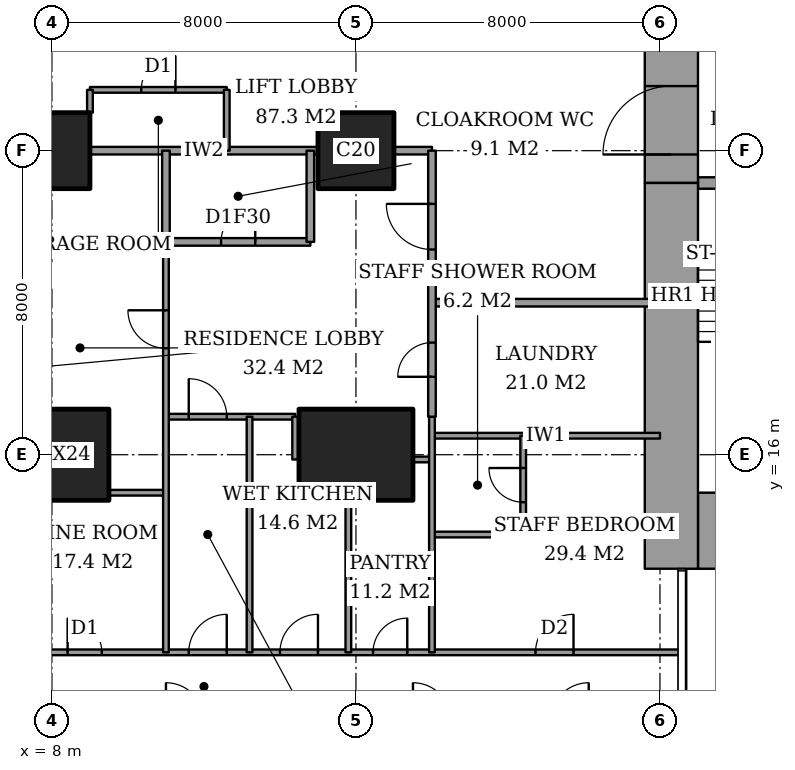
"""IFC4 building model, lengths in metres.
Left out: names, types, materials, properties, quantities, classifications, styles, units other than length and angle.
Written with IfcOpenShell. Run it as: python <this file> out.ifc"""

import sys

from ifc_helpers import new_model, si_unit, direction, frame, frame_2d, origin, origin_2d, place, context, subcontext, project, spatial, rectangle, extrude, element, fill, save


model = new_model("IFC4")
c1 = context("Model", 3, precision=1e-05, world=origin(), true_north=direction((0.0, 1.0)))
c2 = subcontext(c1, "Body", "Model", "MODEL_VIEW")
j1 = project(units=[si_unit("LENGTHUNIT", "METRE"), si_unit("PLANEANGLEUNIT", "RADIAN")], contexts=[c1])
p1 = place(None, origin())
s1 = spatial("IfcSite", under=j1, at=p1, CompositionType="ELEMENT")
p2 = place(p1, origin())
s2 = spatial("IfcBuilding", under=s1, at=p2, CompositionType="ELEMENT")
p3 = place(p2, frame((0.0, 0.0, 96.2)))
s3 = spatial("IfcBuildingStorey", under=s2, at=p3, CompositionType="ELEMENT", Elevation=96.2)
p4 = place(p3, frame((8.0, 16.0, 0.0), z_axis=(0.0, 0.0, 1.0), x_axis=(1.0, 0.0, 0.0)))
e1 = element("IfcColumn", 1, at=p4, inside=s3, PredefinedType="COLUMN", context=c2, shape_type="SweptSolid", body=[
    extrude(rectangle(XDim=3.0, YDim=2.4, at=origin_2d()), origin(), (0.0, 0.0, 1.0), 3.6),
])
p5 = place(p3, frame((8.0, 24.0, 0.0), z_axis=(0.0, 0.0, 1.0), x_axis=(1.0, 0.0, 0.0)))
e2 = element("IfcColumn", 2, at=p5, inside=s3, PredefinedType="COLUMN", context=c2, shape_type="SweptSolid", body=[
    extrude(rectangle(XDim=2.0, YDim=2.0, at=origin_2d()), origin(), (0.0, 0.0, 1.0), 3.6),
])
p6 = place(p3, frame((16.0, 16.0, 0.0), z_axis=(0.0, 0.0, 1.0), x_axis=(1.0, 0.0, 0.0)))
e3 = element("IfcColumn", 3, at=p6, inside=s3, PredefinedType="COLUMN", context=c2, shape_type="SweptSolid", body=[
    extrude(rectangle(XDim=3.0, YDim=2.4, at=origin_2d()), origin(), (0.0, 0.0, 1.0), 3.6),
])
p7 = place(p3, frame((16.0, 24.0, 0.0), z_axis=(0.0, 0.0, 1.0), x_axis=(1.0, 0.0, 0.0)))
e4 = element("IfcColumn", 4, at=p7, inside=s3, PredefinedType="COLUMN", context=c2, shape_type="SweptSolid", body=[
    extrude(rectangle(XDim=2.0, YDim=2.0, at=origin_2d()), origin(), (0.0, 0.0, 1.0), 3.6),
])
p8 = place(p3, frame((25.0, 14.0, 0.0), z_axis=(0.0, 0.0, 1.0), x_axis=(1.0, 0.0, 0.0)))
e5 = element("IfcWall", 5, at=p8, inside=s3, PredefinedType="SHEAR", context=c2, shape_type="SweptSolid", body=[
    extrude(rectangle(XDim=3.15, YDim=2.0, at=frame_2d((1.575, 0.0))), origin(), (0.0, 0.0, 1.0), 3.6),
])
p9 = place(p3, frame((24.3, 13.0, 0.0), z_axis=(0.0, 0.0, 1.0), x_axis=(0.0, 1.0, 0.0)))
e6 = element("IfcWall", 6, at=p9, inside=s3, PredefinedType="SHEAR", context=c2, shape_type="SweptSolid", body=[
    extrude(rectangle(XDim=10.15, YDim=1.4, at=frame_2d((5.075, 0.0))), origin(), (0.0, 0.0, 1.0), 3.6),
])
p10 = place(p3, frame((24.3, 23.15, 0.0), z_axis=(0.0, 0.0, 1.0), x_axis=(0.0, 1.0, 0.0)))
e7 = element("IfcWall", 7, at=p10, inside=s3, PredefinedType="SHEAR", context=c2, shape_type="SweptSolid", body=[
    extrude(rectangle(XDim=11.85, YDim=1.4, at=frame_2d((5.925, 0.0))), origin(), (0.0, 0.0, 1.0), 3.6),
])
p11 = place(p10, frame((0.75, 0.0, 0.0)))
e8 = element("IfcOpeningElement", 8, at=p11, cuts=e7, PredefinedType="OPENING", context=c2, shape_type="SweptSolid", body=[
    extrude(rectangle(XDim=1.8, YDim=2.4, at=frame_2d((0.9, 1.2))), frame((0.0, 0.71, 0.0), z_axis=(0.0, -1.0, 0.0), x_axis=(1.0, 0.0, 0.0)), (0.0, 0.0, 1.0), 1.42),
])
p12 = place(p3, frame((25.0, 23.15, 0.0), z_axis=(0.0, 0.0, 1.0), x_axis=(1.0, 0.0, 0.0)))
e9 = element("IfcWall", 9, at=p12, inside=s3, PredefinedType="SHEAR", context=c2, shape_type="SweptSolid", body=[
    extrude(rectangle(XDim=3.15, YDim=0.3, at=frame_2d((1.575, 0.0))), origin(), (0.0, 0.0, 1.0), 3.6),
])
p13 = place(p12, frame((0.6, 0.0, 0.0)))
e10 = element("IfcOpeningElement", 10, at=p13, cuts=e9, PredefinedType="OPENING", context=c2, shape_type="SweptSolid", body=[
    extrude(rectangle(XDim=1.0, YDim=2.1, at=frame_2d((0.5, 1.05))), frame((0.0, 0.16, 0.0), z_axis=(0.0, -1.0, 0.0), x_axis=(1.0, 0.0, 0.0)), (0.0, 0.0, 1.0), 0.32),
])
p14 = place(p3, frame((-0.45, 10.8, 0.0), z_axis=(0.0, 0.0, 1.0), x_axis=(1.0, 0.0, 0.0)))
e11 = element("IfcWall", 11, at=p14, inside=s3, PredefinedType="PARTITIONING", context=c2, shape_type="SweptSolid", body=[
    extrude(rectangle(XDim=25.011, YDim=0.15, at=frame_2d((12.505, 0.0))), origin(), (0.0, 0.0, 1.0), 3.35),
])
p15 = place(p14, frame((12.05, 0.0, 0.0)))
e12 = element("IfcOpeningElement", 12, at=p15, cuts=e11, PredefinedType="OPENING", context=c2, shape_type="SweptSolid", body=[
    extrude(rectangle(XDim=1.0, YDim=2.1, at=frame_2d((0.5, 1.05))), frame((0.0, 0.085, 0.0), z_axis=(0.0, -1.0, 0.0), x_axis=(1.0, 0.0, 0.0)), (0.0, 0.0, 1.0), 0.17),
])
p16 = place(p14, frame((3.087, 0.0, 0.0)))
e13 = element("IfcOpeningElement", 13, at=p16, cuts=e11, PredefinedType="OPENING", context=c2, shape_type="SweptSolid", body=[
    extrude(rectangle(XDim=1.0, YDim=2.1, at=frame_2d((0.5, 1.05))), frame((0.0, 0.085, 0.0), z_axis=(0.0, -1.0, 0.0), x_axis=(1.0, 0.0, 0.0)), (0.0, 0.0, 1.0), 0.17),
])
p17 = place(p14, frame((8.863, 0.0, 0.0)))
e14 = element("IfcOpeningElement", 14, at=p17, cuts=e11, PredefinedType="OPENING", context=c2, shape_type="SweptSolid", body=[
    extrude(rectangle(XDim=0.9, YDim=2.1, at=frame_2d((0.45, 1.05))), frame((0.0, 0.085, 0.0), z_axis=(0.0, -1.0, 0.0), x_axis=(1.0, 0.0, 0.0)), (0.0, 0.0, 1.0), 0.17),
])
p18 = place(p14, frame((14.45, 0.0, 0.0)))
e15 = element("IfcOpeningElement", 15, at=p18, cuts=e11, PredefinedType="OPENING", context=c2, shape_type="SweptSolid", body=[
    extrude(rectangle(XDim=1.0, YDim=2.1, at=frame_2d((0.5, 1.05))), frame((0.0, 0.085, 0.0), z_axis=(0.0, -1.0, 0.0), x_axis=(1.0, 0.0, 0.0)), (0.0, 0.0, 1.0), 0.17),
])
p19 = place(p14, frame((16.9, 0.0, 0.0)))
e16 = element("IfcOpeningElement", 16, at=p19, cuts=e11, PredefinedType="OPENING", context=c2, shape_type="SweptSolid", body=[
    extrude(rectangle(XDim=0.9, YDim=2.1, at=frame_2d((0.45, 1.05))), frame((0.0, 0.085, 0.0), z_axis=(0.0, -1.0, 0.0), x_axis=(1.0, 0.0, 0.0)), (0.0, 0.0, 1.0), 0.17),
])
p20 = place(p14, frame((21.175, 0.0, 0.0)))
e17 = element("IfcOpeningElement", 17, at=p20, cuts=e11, PredefinedType="OPENING", context=c2, shape_type="SweptSolid", body=[
    extrude(rectangle(XDim=1.0, YDim=2.1, at=frame_2d((0.5, 1.05))), frame((0.0, 0.085, 0.0), z_axis=(0.0, -1.0, 0.0), x_axis=(1.0, 0.0, 0.0)), (0.0, 0.0, 1.0), 0.17),
])
p21 = place(p3, frame((18.0, 13.9, 0.0), z_axis=(0.0, 0.0, 1.0), x_axis=(1.0, 0.0, 0.0)))
e18 = element("IfcWall", 18, at=p21, inside=s3, PredefinedType="PARTITIONING", context=c2, shape_type="SweptSolid", body=[
    extrude(rectangle(XDim=2.4, YDim=0.15, at=frame_2d((1.2, 0.0))), origin(), (0.0, 0.0, 1.0), 3.35),
])
p22 = place(p3, frame((9.5, 15.0, 0.0), z_axis=(0.0, 0.0, 1.0), x_axis=(1.0, 0.0, 0.0)))
e19 = element("IfcWall", 19, at=p22, inside=s3, PredefinedType="PARTITIONING", context=c2, shape_type="SweptSolid", body=[
    extrude(rectangle(XDim=1.5, YDim=0.15, at=frame_2d((0.75, 0.0))), origin(), (0.0, 0.0, 1.0), 3.35),
])
p23 = place(p3, frame((17.5, 15.875, 0.0), z_axis=(0.0, 0.0, 1.0), x_axis=(1.0, 0.0, 0.0)))
e20 = element("IfcWall", 20, at=p23, inside=s3, PredefinedType="PARTITIONING", context=c2, shape_type="SweptSolid", body=[
    extrude(rectangle(XDim=0.5, YDim=0.15, at=frame_2d((0.25, 0.0))), origin(), (0.0, 0.0, 1.0), 2.634),
])
p24 = place(p3, frame((18.0, 16.5, 0.0), z_axis=(0.0, 0.0, 1.0), x_axis=(1.0, 0.0, 0.0)))
e21 = element("IfcWall", 21, at=p24, inside=s3, PredefinedType="PARTITIONING", context=c2, shape_type="SweptSolid", body=[
    extrude(rectangle(XDim=6.0, YDim=0.15, at=frame_2d((3.0, 0.0))), origin(), (0.0, 0.0, 1.0), 3.35),
])
p25 = place(p3, frame((11.0, 17.0, 0.0), z_axis=(0.0, 0.0, 1.0), x_axis=(1.0, 0.0, 0.0)))
e22 = element("IfcWall", 22, at=p25, inside=s3, PredefinedType="PARTITIONING", context=c2, shape_type="SweptSolid", body=[
    extrude(rectangle(XDim=3.4, YDim=0.15, at=frame_2d((1.7, 0.0))), origin(), (0.0, 0.0, 1.0), 3.35),
])
p26 = place(p25, frame((0.6, 0.0, 0.0)))
e23 = element("IfcOpeningElement", 23, at=p26, cuts=e22, PredefinedType="OPENING", context=c2, shape_type="SweptSolid", body=[
    extrude(rectangle(XDim=1.0, YDim=2.1, at=frame_2d((0.5, 1.05))), frame((0.0, 0.085, 0.0), z_axis=(0.0, -1.0, 0.0), x_axis=(1.0, 0.0, 0.0)), (0.0, 0.0, 1.0), 0.17),
])
p27 = place(p3, frame((18.0, 20.0, 0.0), z_axis=(0.0, 0.0, 1.0), x_axis=(1.0, 0.0, 0.0)))
e24 = element("IfcWall", 24, at=p27, inside=s3, PredefinedType="PARTITIONING", context=c2, shape_type="SweptSolid", body=[
    extrude(rectangle(XDim=6.0, YDim=0.2, at=frame_2d((3.0, 0.0))), origin(), (0.0, 0.0, 1.0), 3.35),
])
p28 = place(p3, frame((11.0, 21.6, 0.0), z_axis=(0.0, 0.0, 1.0), x_axis=(1.0, 0.0, 0.0)))
e25 = element("IfcWall", 25, at=p28, inside=s3, PredefinedType="PARTITIONING", context=c2, shape_type="SweptSolid", body=[
    extrude(rectangle(XDim=3.8, YDim=0.2, at=frame_2d((1.9, 0.0))), origin(), (0.0, 0.0, 1.0), 3.35),
])
p29 = place(p28, frame((1.45, 0.0, 0.0)))
e26 = element("IfcOpeningElement", 26, at=p29, cuts=e25, PredefinedType="OPENING", context=c2, shape_type="SweptSolid", body=[
    extrude(rectangle(XDim=0.9, YDim=2.1, at=frame_2d((0.45, 1.05))), frame((0.0, 0.11, 0.0), z_axis=(0.0, -1.0, 0.0), x_axis=(1.0, 0.0, 0.0)), (0.0, 0.0, 1.0), 0.22),
])
p30 = place(p3, frame((9.0, 24.0, 0.0), z_axis=(0.0, 0.0, 1.0), x_axis=(1.0, 0.0, 0.0)))
e27 = element("IfcWall", 27, at=p30, inside=s3, PredefinedType="PARTITIONING", context=c2, shape_type="SweptSolid", body=[
    extrude(rectangle(XDim=6.0, YDim=0.2, at=frame_2d((3.0, 0.0))), origin(), (0.0, 0.0, 1.0), 3.35),
])
p31 = place(p3, frame((17.0, 24.0, 0.0), z_axis=(0.0, 0.0, 1.0), x_axis=(1.0, 0.0, 0.0)))
e28 = element("IfcWall", 28, at=p31, inside=s3, PredefinedType="PARTITIONING", context=c2, shape_type="SweptSolid", body=[
    extrude(rectangle(XDim=1.0, YDim=0.2, at=frame_2d((0.5, 0.0))), origin(), (0.0, 0.0, 1.0), 3.35),
])
p32 = place(p3, frame((9.0, 25.6, 0.0), z_axis=(0.0, 0.0, 1.0), x_axis=(1.0, 0.0, 0.0)))
e29 = element("IfcWall", 29, at=p32, inside=s3, PredefinedType="PARTITIONING", context=c2, shape_type="SweptSolid", body=[
    extrude(rectangle(XDim=3.6, YDim=0.15, at=frame_2d((1.8, 0.0))), origin(), (0.0, 0.0, 1.0), 3.35),
])
p33 = place(p32, frame((1.35, 0.0, 0.0)))
e30 = element("IfcOpeningElement", 30, at=p33, cuts=e29, PredefinedType="OPENING", context=c2, shape_type="SweptSolid", body=[
    extrude(rectangle(XDim=0.9, YDim=2.1, at=frame_2d((0.45, 1.05))), frame((0.0, 0.085, 0.0), z_axis=(0.0, -1.0, 0.0), x_axis=(1.0, 0.0, 0.0)), (0.0, 0.0, 1.0), 0.17),
])
p34 = place(p3, frame((9.0, 25.0, 0.0), z_axis=(0.0, 0.0, 1.0), x_axis=(0.0, 1.0, 0.0)))
e31 = element("IfcWall", 31, at=p34, inside=s3, PredefinedType="PARTITIONING", context=c2, shape_type="SweptSolid", body=[
    extrude(rectangle(XDim=0.6, YDim=0.15, at=frame_2d((0.3, 0.0))), origin(), (0.0, 0.0, 1.0), 3.35),
])
p35 = place(p3, frame((11.0, 21.6, 0.0), z_axis=(0.0, 0.0, 1.0), x_axis=(0.0, 1.0, 0.0)))
e32 = element("IfcWall", 32, at=p35, inside=s3, PredefinedType="PARTITIONING", context=c2, shape_type="SweptSolid", body=[
    extrude(rectangle(XDim=2.4, YDim=0.2, at=frame_2d((1.2, 0.0))), origin(), (0.0, 0.0, 1.0), 3.35),
])
p36 = place(p3, frame((11.0, 10.8, 0.0), z_axis=(0.0, 0.0, 1.0), x_axis=(0.0, 1.0, 0.0)))
e33 = element("IfcWall", 33, at=p36, inside=s3, PredefinedType="PARTITIONING", context=c2, shape_type="SweptSolid", body=[
    extrude(rectangle(XDim=10.8, YDim=0.15, at=frame_2d((5.4, 0.0))), origin(), (0.0, 0.0, 1.0), 3.35),
])
p37 = place(p36, frame((8.0, 0.0, 0.0)))
e34 = element("IfcOpeningElement", 34, at=p37, cuts=e33, PredefinedType="OPENING", context=c2, shape_type="SweptSolid", body=[
    extrude(rectangle(XDim=1.0, YDim=2.1, at=frame_2d((0.5, 1.05))), frame((0.0, 0.085, 0.0), z_axis=(0.0, -1.0, 0.0), x_axis=(1.0, 0.0, 0.0)), (0.0, 0.0, 1.0), 0.17),
])
p38 = place(p3, frame((12.6, 24.0, 0.0), z_axis=(0.0, 0.0, 1.0), x_axis=(0.0, 1.0, 0.0)))
e35 = element("IfcWall", 35, at=p38, inside=s3, PredefinedType="PARTITIONING", context=c2, shape_type="SweptSolid", body=[
    extrude(rectangle(XDim=1.6, YDim=0.15, at=frame_2d((0.8, 0.0))), origin(), (0.0, 0.0, 1.0), 3.35),
])
p39 = place(p3, frame((13.2, 10.8, 0.0), z_axis=(0.0, 0.0, 1.0), x_axis=(0.0, 1.0, 0.0)))
e36 = element("IfcWall", 36, at=p39, inside=s3, PredefinedType="PARTITIONING", context=c2, shape_type="SweptSolid", body=[
    extrude(rectangle(XDim=6.2, YDim=0.15, at=frame_2d((3.1, 0.0))), origin(), (0.0, 0.0, 1.0), 3.35),
])
p40 = place(p3, frame((14.4, 15.875, 0.0), z_axis=(0.0, 0.0, 1.0), x_axis=(0.0, 1.0, 0.0)))
e37 = element("IfcWall", 37, at=p40, inside=s3, PredefinedType="PARTITIONING", context=c2, shape_type="SweptSolid", body=[
    extrude(rectangle(XDim=1.125, YDim=0.15, at=frame_2d((0.562, 0.0))), origin(), (0.0, 0.0, 1.0), 3.35),
])
p41 = place(p3, frame((14.8, 21.6, 0.0), z_axis=(0.0, 0.0, 1.0), x_axis=(0.0, 1.0, 0.0)))
e38 = element("IfcWall", 38, at=p41, inside=s3, PredefinedType="PARTITIONING", context=c2, shape_type="SweptSolid", body=[
    extrude(rectangle(XDim=2.4, YDim=0.2, at=frame_2d((1.2, 0.0))), origin(), (0.0, 0.0, 1.0), 3.35),
])
p42 = place(p3, frame((15.8, 10.8, 0.0), z_axis=(0.0, 0.0, 1.0), x_axis=(0.0, 1.0, 0.0)))
e39 = element("IfcWall", 39, at=p42, inside=s3, PredefinedType="PARTITIONING", context=c2, shape_type="SweptSolid", body=[
    extrude(rectangle(XDim=4.0, YDim=0.15, at=frame_2d((2.0, 0.0))), origin(), (0.0, 0.0, 1.0), 3.35),
])
p43 = place(p3, frame((18.0, 17.0, 0.0), z_axis=(0.0, 0.0, 1.0), x_axis=(0.0, 1.0, 0.0)))
e40 = element("IfcWall", 40, at=p43, inside=s3, PredefinedType="PARTITIONING", context=c2, shape_type="SweptSolid", body=[
    extrude(rectangle(XDim=7.0, YDim=0.2, at=frame_2d((3.5, 0.0))), origin(), (0.0, 0.0, 1.0), 3.35),
])
p44 = place(p43, frame((4.4, 0.0, 0.0)))
e41 = element("IfcOpeningElement", 41, at=p44, cuts=e40, PredefinedType="OPENING", context=c2, shape_type="SweptSolid", body=[
    extrude(rectangle(XDim=1.2, YDim=2.4, at=frame_2d((0.6, 1.2))), frame((0.0, 0.11, 0.0), z_axis=(0.0, -1.0, 0.0), x_axis=(1.0, 0.0, 0.0)), (0.0, 0.0, 1.0), 0.22),
])
p45 = place(p43, frame((1.05, 0.0, 0.0)))
e42 = element("IfcOpeningElement", 42, at=p45, cuts=e40, PredefinedType="OPENING", context=c2, shape_type="SweptSolid", body=[
    extrude(rectangle(XDim=0.9, YDim=2.1, at=frame_2d((0.45, 1.05))), frame((0.0, 0.11, 0.0), z_axis=(0.0, -1.0, 0.0), x_axis=(1.0, 0.0, 0.0)), (0.0, 0.0, 1.0), 0.22),
])
p46 = place(p3, frame((18.0, 10.8, 0.0), z_axis=(0.0, 0.0, 1.0), x_axis=(0.0, 1.0, 0.0)))
e43 = element("IfcWall", 43, at=p46, inside=s3, PredefinedType="PARTITIONING", context=c2, shape_type="SweptSolid", body=[
    extrude(rectangle(XDim=6.2, YDim=0.15, at=frame_2d((3.1, 0.0))), origin(), (0.0, 0.0, 1.0), 3.35),
])
p47 = place(p3, frame((20.4, 13.9, 0.0), z_axis=(0.0, 0.0, 1.0), x_axis=(0.0, 1.0, 0.0)))
e44 = element("IfcWall", 44, at=p47, inside=s3, PredefinedType="PARTITIONING", context=c2, shape_type="SweptSolid", body=[
    extrude(rectangle(XDim=2.6, YDim=0.15, at=frame_2d((1.3, 0.0))), origin(), (0.0, 0.0, 1.0), 3.35),
])
p48 = place(p47, frame((0.85, 0.0, 0.0)))
e45 = element("IfcOpeningElement", 45, at=p48, cuts=e44, PredefinedType="OPENING", context=c2, shape_type="SweptSolid", body=[
    extrude(rectangle(XDim=0.9, YDim=2.1, at=frame_2d((0.45, 1.05))), frame((0.0, 0.085, 0.0), z_axis=(0.0, -1.0, 0.0), x_axis=(1.0, 0.0, 0.0)), (0.0, 0.0, 1.0), 0.17),
])
p49 = place(p15, origin())
e46 = element("IfcDoor", 46, at=p49, inside=s3, OperationType="SINGLE_SWING_LEFT", PredefinedType="DOOR", context=c2, shape_type="SweptSolid", body=[
    extrude(rectangle(XDim=1.0, YDim=2.1, at=frame_2d((0.5, 1.05))), frame((0.0, 0.025, 0.0), z_axis=(0.0, -1.0, 0.0), x_axis=(1.0, 0.0, 0.0)), (0.0, 0.0, 1.0), 0.05),
])
fill(e12, e46)
p50 = place(p17, origin())
e47 = element("IfcDoor", 47, at=p50, inside=s3, OperationType="SINGLE_SWING_RIGHT", PredefinedType="DOOR", context=c2, shape_type="SweptSolid", body=[
    extrude(rectangle(XDim=0.9, YDim=2.1, at=frame_2d((0.45, 1.05))), frame((0.0, 0.025, 0.0), z_axis=(0.0, -1.0, 0.0), x_axis=(1.0, 0.0, 0.0)), (0.0, 0.0, 1.0), 0.05),
])
fill(e14, e47)
p51 = place(p37, origin())
e48 = element("IfcDoor", 48, at=p51, inside=s3, OperationType="SINGLE_SWING_LEFT", PredefinedType="DOOR", context=c2, shape_type="SweptSolid", body=[
    extrude(rectangle(XDim=1.0, YDim=2.1, at=frame_2d((0.5, 1.05))), frame((0.0, 0.025, 0.0), z_axis=(0.0, -1.0, 0.0), x_axis=(1.0, 0.0, 0.0)), (0.0, 0.0, 1.0), 0.05),
])
fill(e34, e48)
p52 = place(p29, origin())
e49 = element("IfcDoor", 49, at=p52, inside=s3, OperationType="SINGLE_SWING_LEFT", PredefinedType="DOOR", context=c2, shape_type="SweptSolid", body=[
    extrude(rectangle(XDim=0.9, YDim=2.1, at=frame_2d((0.45, 1.05))), frame((0.0, 0.025, 0.0), z_axis=(0.0, -1.0, 0.0), x_axis=(1.0, 0.0, 0.0)), (0.0, 0.0, 1.0), 0.05),
])
fill(e26, e49)
p53 = place(p44, origin())
e50 = element("IfcDoor", 50, at=p53, inside=s3, OperationType="SINGLE_SWING_LEFT", PredefinedType="DOOR", context=c2, shape_type="SweptSolid", body=[
    extrude(rectangle(XDim=1.2, YDim=2.4, at=frame_2d((0.6, 1.2))), frame((0.0, 0.025, 0.0), z_axis=(0.0, -1.0, 0.0), x_axis=(1.0, 0.0, 0.0)), (0.0, 0.0, 1.0), 0.05),
])
fill(e41, e50)
p54 = place(p26, origin())
e51 = element("IfcDoor", 51, at=p54, inside=s3, OperationType="SINGLE_SWING_RIGHT", PredefinedType="DOOR", context=c2, shape_type="SweptSolid", body=[
    extrude(rectangle(XDim=1.0, YDim=2.1, at=frame_2d((0.5, 1.05))), frame((0.0, 0.025, 0.0), z_axis=(0.0, -1.0, 0.0), x_axis=(1.0, 0.0, 0.0)), (0.0, 0.0, 1.0), 0.05),
])
fill(e23, e51)
p55 = place(p18, origin())
e52 = element("IfcDoor", 52, at=p55, inside=s3, OperationType="SINGLE_SWING_LEFT", PredefinedType="DOOR", context=c2, shape_type="SweptSolid", body=[
    extrude(rectangle(XDim=1.0, YDim=2.1, at=frame_2d((0.5, 1.05))), frame((0.0, 0.025, 0.0), z_axis=(0.0, -1.0, 0.0), x_axis=(1.0, 0.0, 0.0)), (0.0, 0.0, 1.0), 0.05),
])
fill(e15, e52)
p56 = place(p19, origin())
e53 = element("IfcDoor", 53, at=p56, inside=s3, OperationType="SINGLE_SWING_LEFT", PredefinedType="DOOR", context=c2, shape_type="SweptSolid", body=[
    extrude(rectangle(XDim=0.9, YDim=2.1, at=frame_2d((0.45, 1.05))), frame((0.0, 0.025, 0.0), z_axis=(0.0, -1.0, 0.0), x_axis=(1.0, 0.0, 0.0)), (0.0, 0.0, 1.0), 0.05),
])
fill(e16, e53)
p57 = place(p48, origin())
e54 = element("IfcDoor", 54, at=p57, inside=s3, OperationType="SINGLE_SWING_LEFT", PredefinedType="DOOR", context=c2, shape_type="SweptSolid", body=[
    extrude(rectangle(XDim=0.9, YDim=2.1, at=frame_2d((0.45, 1.05))), frame((0.0, 0.025, 0.0), z_axis=(0.0, -1.0, 0.0), x_axis=(1.0, 0.0, 0.0)), (0.0, 0.0, 1.0), 0.05),
])
fill(e45, e54)
p58 = place(p20, origin())
e55 = element("IfcDoor", 55, at=p58, inside=s3, OperationType="SINGLE_SWING_LEFT", PredefinedType="DOOR", context=c2, shape_type="SweptSolid", body=[
    extrude(rectangle(XDim=1.0, YDim=2.1, at=frame_2d((0.5, 1.05))), frame((0.0, 0.025, 0.0), z_axis=(0.0, -1.0, 0.0), x_axis=(1.0, 0.0, 0.0)), (0.0, 0.0, 1.0), 0.05),
])
fill(e17, e55)
p59 = place(p45, origin())
e56 = element("IfcDoor", 56, at=p59, inside=s3, OperationType="SINGLE_SWING_RIGHT", PredefinedType="DOOR", context=c2, shape_type="SweptSolid", body=[
    extrude(rectangle(XDim=0.9, YDim=2.1, at=frame_2d((0.45, 1.05))), frame((0.0, 0.025, 0.0), z_axis=(0.0, -1.0, 0.0), x_axis=(1.0, 0.0, 0.0)), (0.0, 0.0, 1.0), 0.05),
])
fill(e42, e56)
p60 = place(p33, origin())
e57 = element("IfcDoor", 57, at=p60, inside=s3, OperationType="SINGLE_SWING_LEFT", PredefinedType="DOOR", context=c2, shape_type="SweptSolid", body=[
    extrude(rectangle(XDim=0.9, YDim=2.1, at=frame_2d((0.45, 1.05))), frame((0.0, 0.025, 0.0), z_axis=(0.0, -1.0, 0.0), x_axis=(1.0, 0.0, 0.0)), (0.0, 0.0, 1.0), 0.05),
])
fill(e30, e57)
p61 = place(p11, origin())
e58 = element("IfcDoor", 58, at=p61, inside=s3, OperationType="DOUBLE_DOOR_DOUBLE_SWING", PredefinedType="DOOR", context=c2, shape_type="SweptSolid", body=[
    extrude(rectangle(XDim=1.8, YDim=2.4, at=frame_2d((0.9, 1.2))), frame((0.0, 0.025, 0.0), z_axis=(0.0, -1.0, 0.0), x_axis=(1.0, 0.0, 0.0)), (0.0, 0.0, 1.0), 0.05),
])
fill(e8, e58)
save(model, sys.argv[1])
